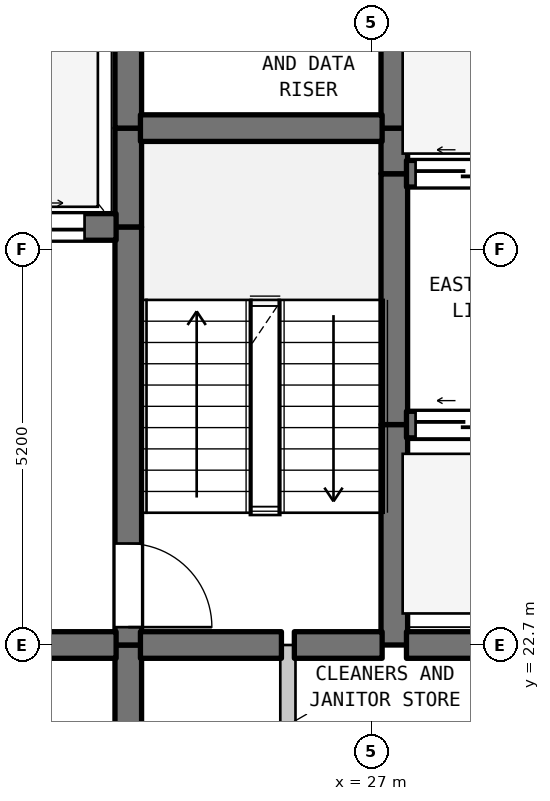
"""IFC4 building model, lengths in metres.
Left out: names, types, materials, properties, quantities, classifications, styles, units other than length and angle.
Written with IfcOpenShell. Run it as: python <this file> out.ifc"""

import sys

from ifc_helpers import new_model, si_unit, direction, frame, frame_2d, origin, place, context, subcontext, project, spatial, rectangle, extrude, element, fill, save


model = new_model("IFC4")
c1 = context("Model", 3, precision=1e-05, world=origin(), true_north=direction((0.0, 1.0)))
c2 = subcontext(c1, "Body", "Model", "MODEL_VIEW")
j1 = project(units=[si_unit("LENGTHUNIT", "METRE"), si_unit("PLANEANGLEUNIT", "RADIAN")], contexts=[c1])
p1 = place(None, origin())
s1 = spatial("IfcSite", under=j1, at=p1, CompositionType="ELEMENT")
p2 = place(p1, origin())
s2 = spatial("IfcBuilding", under=s1, at=p2, CompositionType="ELEMENT")
p3 = place(p2, frame((0.0, 0.0, 90.9)))
s3 = spatial("IfcBuildingStorey", under=s2, at=p3, CompositionType="ELEMENT", Elevation=90.9)
p4 = place(p3, frame((23.8, 19.5, 0.0), z_axis=(0.0, 0.0, 1.0), x_axis=(0.0, 1.0, 0.0)))
e1 = element("IfcWall", 1, at=p4, inside=s3, PredefinedType="SHEAR", context=c2, shape_type="SweptSolid", body=[
    extrude(rectangle(XDim=3.2, YDim=0.35, at=frame_2d((1.6, 0.0))), origin(), (0.0, 0.0, 1.0), 3.385),
])
p5 = place(p3, frame((23.8, 22.7, 0.0), z_axis=(0.0, 0.0, 1.0), x_axis=(0.0, 1.0, 0.0)))
e2 = element("IfcWall", 2, at=p5, inside=s3, PredefinedType="SHEAR", context=c2, shape_type="SweptSolid", body=[
    extrude(rectangle(XDim=5.5, YDim=0.35, at=frame_2d((2.75, 0.0))), origin(), (0.0, 0.0, 1.0), 3.385),
])
p6 = place(p5, frame((0.235, 0.0, 0.0)))
e3 = element("IfcOpeningElement", 3, at=p6, cuts=e2, PredefinedType="OPENING", context=c2, shape_type="SweptSolid", body=[
    extrude(rectangle(XDim=1.1, YDim=2.15, at=frame_2d((0.55, 1.075))), frame((0.0, 0.185, 0.0), z_axis=(0.0, -1.0, 0.0), x_axis=(1.0, 0.0, 0.0)), (0.0, 0.0, 1.0), 0.37),
])
for number, where, z_axis, x_axis in (
    (4, (23.8, 28.2, 0.0), (0.0, 0.0, 1.0), (0.0, 1.0, 0.0)),
    (5, (23.8, 29.5, 0.0), (0.0, 0.0, 1.0), (0.0, 1.0, 0.0)),
):
    element("IfcWall", number, at=place(p3, frame(where, z_axis=z_axis, x_axis=x_axis)), inside=s3, PredefinedType="SHEAR", context=c2, shape_type="SweptSolid", body=[
        extrude(rectangle(XDim=1.3, YDim=0.35, at=frame_2d((0.65, 0.0))), origin(), (0.0, 0.0, 1.0), 3.385),
    ])
p7 = place(p3, frame((25.9, 19.5, 0.0), z_axis=(0.0, 0.0, 1.0), x_axis=(0.0, 1.0, 0.0)))
e6 = element("IfcWall", 6, at=p7, inside=s3, PredefinedType="STANDARD", context=c2, shape_type="SweptSolid", body=[
    extrude(rectangle(XDim=3.2, YDim=0.2, at=frame_2d((1.6, 0.0))), origin(), (0.0, 0.0, 1.0), 3.385),
])
p8 = place(p3, frame((27.3, 22.7, 0.0), z_axis=(0.0, 0.0, 1.0), x_axis=(0.0, 1.0, 0.0)))
e7 = element("IfcWall", 7, at=p8, inside=s3, PredefinedType="SHEAR", context=c2, shape_type="SweptSolid", body=[
    extrude(rectangle(XDim=2.9, YDim=0.35, at=frame_2d((1.45, 0.0))), origin(), (0.0, 0.0, 1.0), 3.385),
])
p9 = place(p3, frame((27.3, 25.6, 0.0), z_axis=(0.0, 0.0, 1.0), x_axis=(0.0, 1.0, 0.0)))
e8 = element("IfcWall", 8, at=p9, inside=s3, PredefinedType="SHEAR", context=c2, shape_type="SweptSolid", body=[
    extrude(rectangle(XDim=3.3, YDim=0.35, at=frame_2d((1.65, 0.0))), origin(), (0.0, 0.0, 1.0), 3.385),
])
p10 = place(p3, frame((27.3, 28.9, 0.0), z_axis=(0.0, 0.0, 1.0), x_axis=(0.0, 1.0, 0.0)))
e9 = element("IfcWall", 9, at=p10, inside=s3, PredefinedType="SHEAR", context=c2, shape_type="SweptSolid", body=[
    extrude(rectangle(XDim=0.6, YDim=0.35, at=frame_2d((0.3, 0.0))), origin(), (0.0, 0.0, 1.0), 3.385),
])
p11 = place(p3, frame((27.3, 29.5, 0.0), z_axis=(0.0, 0.0, 1.0), x_axis=(0.0, 1.0, 0.0)))
e10 = element("IfcWall", 10, at=p11, inside=s3, PredefinedType="SHEAR", context=c2, shape_type="SweptSolid", body=[
    extrude(rectangle(XDim=2.0, YDim=0.35, at=frame_2d((1.0, 0.0))), origin(), (0.0, 0.0, 1.0), 3.385),
])
p12 = place(p3, frame((19.16, 22.7, 0.0), z_axis=(0.0, 0.0, 1.0), x_axis=(1.0, 0.0, 0.0)))
e11 = element("IfcWall", 11, at=p12, inside=s3, PredefinedType="SHEAR", context=c2, shape_type="SweptSolid", body=[
    extrude(rectangle(XDim=4.48, YDim=0.35, at=frame_2d((2.24, 0.0))), origin(), (0.0, 0.0, 1.0), 3.385),
])
p13 = place(p12, frame((1.64, 0.0, 0.0)))
e12 = element("IfcOpeningElement", 12, at=p13, cuts=e11, PredefinedType="OPENING", context=c2, shape_type="SweptSolid", body=[
    extrude(rectangle(XDim=1.2, YDim=2.2, at=frame_2d((0.6, 1.1))), frame((0.0, 0.185, 0.0), z_axis=(0.0, -1.0, 0.0), x_axis=(1.0, 0.0, 0.0)), (0.0, 0.0, 1.0), 0.37),
])
p14 = place(p3, frame((23.96, 22.7, 0.0), z_axis=(0.0, 0.0, 1.0), x_axis=(1.0, 0.0, 0.0)))
e13 = element("IfcWall", 13, at=p14, inside=s3, PredefinedType="SHEAR", context=c2, shape_type="SweptSolid", body=[
    extrude(rectangle(XDim=1.855, YDim=0.35, at=frame_2d((0.927, 0.0))), origin(), (0.0, 0.0, 1.0), 3.385),
])
p15 = place(p3, frame((25.985, 22.7, 0.0), z_axis=(0.0, 0.0, 1.0), x_axis=(1.0, 0.0, 0.0)))
e14 = element("IfcWall", 14, at=p15, inside=s3, PredefinedType="SHEAR", context=c2, shape_type="SweptSolid", body=[
    extrude(rectangle(XDim=1.155, YDim=0.35, at=frame_2d((0.577, 0.0))), origin(), (0.0, 0.0, 1.0), 3.385),
])
p16 = place(p3, frame((27.46, 22.7, 0.0), z_axis=(0.0, 0.0, 1.0), x_axis=(1.0, 0.0, 0.0)))
e15 = element("IfcWall", 15, at=p16, inside=s3, PredefinedType="SHEAR", context=c2, shape_type="SweptSolid", body=[
    extrude(rectangle(XDim=3.18, YDim=0.35, at=frame_2d((1.59, 0.0))), origin(), (0.0, 0.0, 1.0), 3.385),
])
p17 = place(p3, frame((27.46, 25.6, 0.0), z_axis=(0.0, 0.0, 1.0), x_axis=(1.0, 0.0, 0.0)))
e16 = element("IfcWall", 16, at=p17, inside=s3, PredefinedType="SHEAR", context=c2, shape_type="SweptSolid", body=[
    extrude(rectangle(XDim=3.18, YDim=0.35, at=frame_2d((1.59, 0.0))), origin(), (0.0, 0.0, 1.0), 3.385),
])
p18 = place(p17, frame((0.12, 0.0, 0.0)))
e17 = element("IfcOpeningElement", 17, at=p18, cuts=e16, PredefinedType="OPENING", context=c2, shape_type="SweptSolid", body=[
    extrude(rectangle(XDim=1.25, YDim=2.2, at=frame_2d((0.625, 1.1))), frame((0.0, 0.185, 0.0), z_axis=(0.0, -1.0, 0.0), x_axis=(1.0, 0.0, 0.0)), (0.0, 0.0, 1.0), 0.37),
])
p19 = place(p17, frame((1.81, 0.0, 0.0)))
e18 = element("IfcOpeningElement", 18, at=p19, cuts=e16, PredefinedType="OPENING", context=c2, shape_type="SweptSolid", body=[
    extrude(rectangle(XDim=1.25, YDim=2.2, at=frame_2d((0.625, 1.1))), frame((0.0, 0.185, 0.0), z_axis=(0.0, -1.0, 0.0), x_axis=(1.0, 0.0, 0.0)), (0.0, 0.0, 1.0), 0.37),
])
p20 = place(p3, frame((19.16, 28.2, 0.0), z_axis=(0.0, 0.0, 1.0), x_axis=(1.0, 0.0, 0.0)))
e19 = element("IfcWall", 19, at=p20, inside=s3, PredefinedType="SHEAR", context=c2, shape_type="SweptSolid", body=[
    extrude(rectangle(XDim=4.48, YDim=0.35, at=frame_2d((2.24, 0.0))), origin(), (0.0, 0.0, 1.0), 3.385),
])
p21 = place(p20, frame((0.415, 0.0, 0.0)))
e20 = element("IfcOpeningElement", 20, at=p21, cuts=e19, PredefinedType="OPENING", context=c2, shape_type="SweptSolid", body=[
    extrude(rectangle(XDim=1.25, YDim=2.2, at=frame_2d((0.625, 1.1))), frame((0.0, 0.185, 0.0), z_axis=(0.0, -1.0, 0.0), x_axis=(1.0, 0.0, 0.0)), (0.0, 0.0, 1.0), 0.37),
])
p22 = place(p20, frame((2.815, 0.0, 0.0)))
e21 = element("IfcOpeningElement", 21, at=p22, cuts=e19, PredefinedType="OPENING", context=c2, shape_type="SweptSolid", body=[
    extrude(rectangle(XDim=1.25, YDim=2.2, at=frame_2d((0.625, 1.1))), frame((0.0, 0.185, 0.0), z_axis=(0.0, -1.0, 0.0), x_axis=(1.0, 0.0, 0.0)), (0.0, 0.0, 1.0), 0.37),
])
p23 = place(p3, frame((27.46, 28.9, 0.0), z_axis=(0.0, 0.0, 1.0), x_axis=(1.0, 0.0, 0.0)))
e22 = element("IfcWall", 22, at=p23, inside=s3, PredefinedType="SHEAR", context=c2, shape_type="SweptSolid", body=[
    extrude(rectangle(XDim=3.18, YDim=0.35, at=frame_2d((1.59, 0.0))), origin(), (0.0, 0.0, 1.0), 3.385),
])
p24 = place(p23, frame((0.12, 0.0, 0.0)))
e23 = element("IfcOpeningElement", 23, at=p24, cuts=e22, PredefinedType="OPENING", context=c2, shape_type="SweptSolid", body=[
    extrude(rectangle(XDim=1.25, YDim=2.2, at=frame_2d((0.625, 1.1))), frame((0.0, 0.185, 0.0), z_axis=(0.0, -1.0, 0.0), x_axis=(1.0, 0.0, 0.0)), (0.0, 0.0, 1.0), 0.37),
])
p25 = place(p23, frame((1.81, 0.0, 0.0)))
e24 = element("IfcOpeningElement", 24, at=p25, cuts=e22, PredefinedType="OPENING", context=c2, shape_type="SweptSolid", body=[
    extrude(rectangle(XDim=1.25, YDim=2.2, at=frame_2d((0.625, 1.1))), frame((0.0, 0.185, 0.0), z_axis=(0.0, -1.0, 0.0), x_axis=(1.0, 0.0, 0.0)), (0.0, 0.0, 1.0), 0.37),
])
p26 = place(p3, frame((23.96, 29.5, 0.0), z_axis=(0.0, 0.0, 1.0), x_axis=(1.0, 0.0, 0.0)))
e25 = element("IfcWall", 25, at=p26, inside=s3, PredefinedType="SHEAR", context=c2, shape_type="SweptSolid", body=[
    extrude(rectangle(XDim=3.18, YDim=0.35, at=frame_2d((1.59, 0.0))), origin(), (0.0, 0.0, 1.0), 3.385),
])
p27 = place(p6, frame((1.1, 0.0, 0.0), z_axis=(0.0, 0.0, 1.0), x_axis=(-1.0, 0.0, 0.0)))
e26 = element("IfcDoor", 26, at=p27, inside=s3, OperationType="SINGLE_SWING_LEFT", PredefinedType="DOOR", context=c2, shape_type="SweptSolid", body=[
    extrude(rectangle(XDim=1.1, YDim=2.15, at=frame_2d((0.55, 1.075))), frame((0.0, 0.025, 0.0), z_axis=(0.0, -1.0, 0.0), x_axis=(1.0, 0.0, 0.0)), (0.0, 0.0, 1.0), 0.05),
])
fill(e3, e26)
p28 = place(p18, origin())
e27 = element("IfcDoor", 27, at=p28, inside=s3, OperationType="DOUBLE_DOOR_SLIDING", PredefinedType="DOOR", context=c2, shape_type="SweptSolid", body=[
    extrude(rectangle(XDim=1.25, YDim=2.2, at=frame_2d((0.625, 1.1))), frame((0.0, 0.025, 0.0), z_axis=(0.0, -1.0, 0.0), x_axis=(1.0, 0.0, 0.0)), (0.0, 0.0, 1.0), 0.05),
])
fill(e17, e27)
p29 = place(p22, origin())
e28 = element("IfcDoor", 28, at=p29, inside=s3, OperationType="DOUBLE_DOOR_SLIDING", PredefinedType="DOOR", context=c2, shape_type="SweptSolid", body=[
    extrude(rectangle(XDim=1.25, YDim=2.2, at=frame_2d((0.625, 1.1))), frame((0.0, 0.025, 0.0), z_axis=(0.0, -1.0, 0.0), x_axis=(1.0, 0.0, 0.0)), (0.0, 0.0, 1.0), 0.05),
])
fill(e21, e28)
p30 = place(p24, origin())
e29 = element("IfcDoor", 29, at=p30, inside=s3, OperationType="DOUBLE_DOOR_SLIDING", PredefinedType="DOOR", context=c2, shape_type="SweptSolid", body=[
    extrude(rectangle(XDim=1.25, YDim=2.2, at=frame_2d((0.625, 1.1))), frame((0.0, 0.025, 0.0), z_axis=(0.0, -1.0, 0.0), x_axis=(1.0, 0.0, 0.0)), (0.0, 0.0, 1.0), 0.05),
])
fill(e23, e29)
save(model, sys.argv[1])
